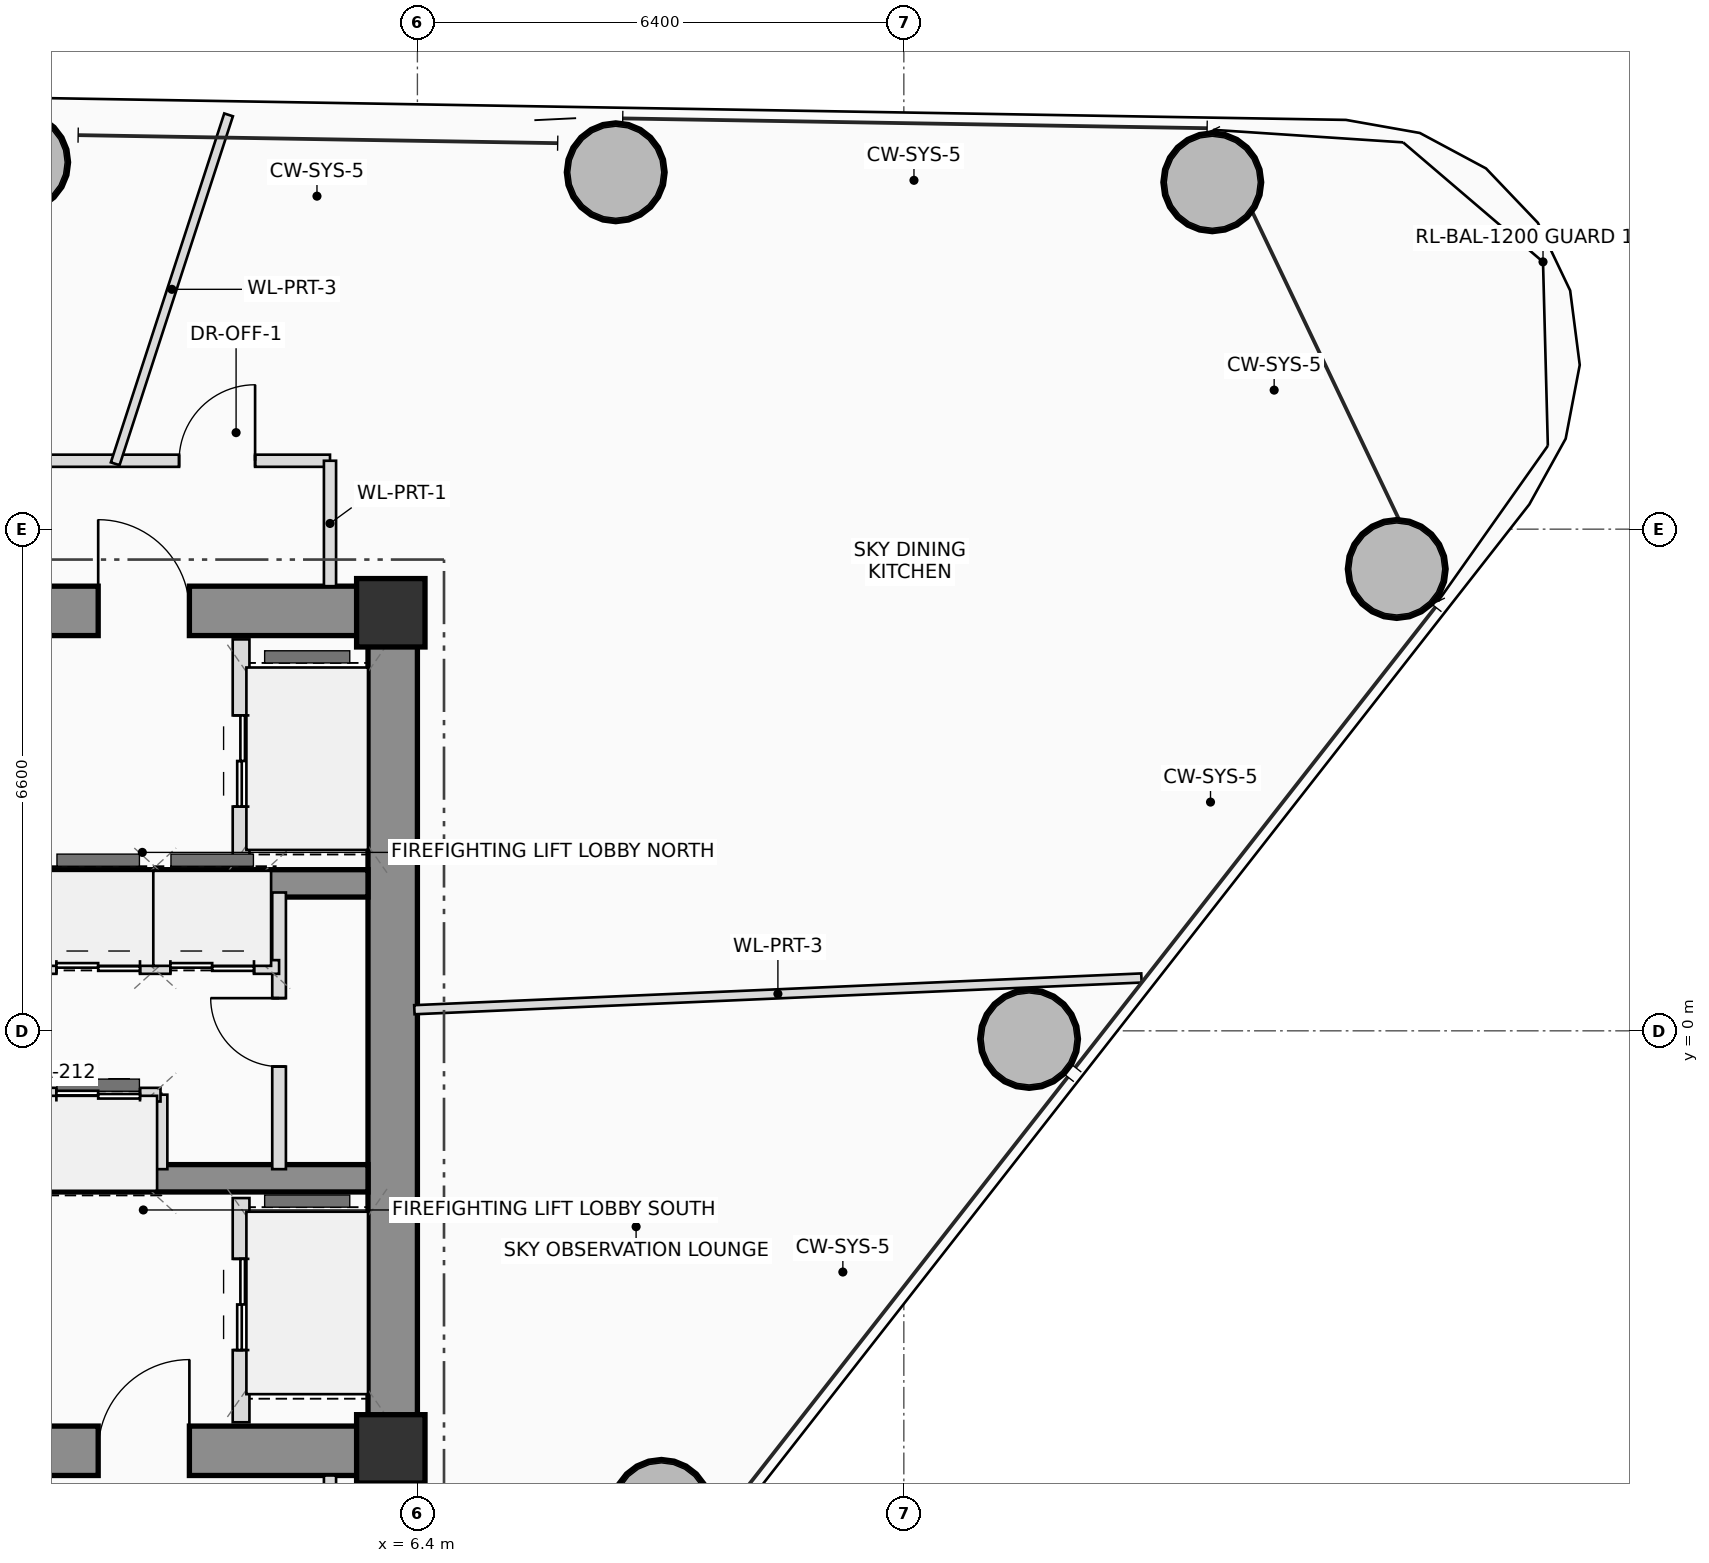
"""IFC4 building model, lengths in metres.
Left out: names, types, materials, properties, quantities, classifications, styles, units other than length and angle.
Written with IfcOpenShell. Run it as: python <this file> out.ifc"""

import sys

from ifc_helpers import new_model, si_unit, direction, frame, frame_2d, origin, origin_2d, place, context, subcontext, project, spatial, rectangle, hollow_circle, extrude, source, transform, mapped, element, fill, save


model = new_model("IFC4")
c1 = context("Model", 3, precision=1e-05, world=origin(), true_north=direction((0.0, 1.0)))
c2 = subcontext(c1, "Body", "Model", "MODEL_VIEW")
j1 = project(units=[si_unit("LENGTHUNIT", "METRE"), si_unit("PLANEANGLEUNIT", "RADIAN")], contexts=[c1])
p1 = place(None, origin())
s1 = spatial("IfcSite", under=j1, at=p1, CompositionType="ELEMENT")
p2 = place(p1, origin())
s2 = spatial("IfcBuilding", under=s1, at=p2, CompositionType="ELEMENT")
p3 = place(p2, frame((0.0, 0.0, 125.0)))
s3 = spatial("IfcBuildingStorey", under=s2, at=p3, CompositionType="ELEMENT", Elevation=125.0)
m1 = source(origin(), c2, "Body", "SweptSolid", [
    extrude(rectangle(XDim=0.9, YDim=0.9, at=origin_2d()), origin(), (0.0, 0.0, 1.0), 4.5),
])
for number, where, z_axis, x_axis in (
    (1, (6.05, -5.5, 0.0), (0.0, 0.0, 1.0), (1.0, 0.0, 0.0)),
    (2, (6.05, 5.5, 0.0), (0.0, 0.0, 1.0), (1.0, 0.0, 0.0)),
):
    element("IfcColumn", number, at=place(p3, frame(where, z_axis=z_axis, x_axis=x_axis)), inside=s3, PredefinedType="COLUMN", context=c2, shape_type="MappedRepresentation", body=[
        mapped(m1, transform((0.0, 0.0, 0.0), scale=1.0)),
    ])
p4 = place(p3, frame((-6.4, 5.525, 0.0), z_axis=(0.0, 0.0, 1.0), x_axis=(1.0, 0.0, 0.0)))
e3 = element("IfcWall", 3, at=p4, inside=s3, PredefinedType="SHEAR", context=c2, shape_type="SweptSolid", body=[
    extrude(rectangle(XDim=12.8, YDim=0.65, at=frame_2d((6.4, 0.0))), origin(), (0.0, 0.0, 1.0), 4.5),
])
p5 = place(p4, frame((8.6, 0.0, 0.0)))
e4 = element("IfcOpeningElement", 4, at=p5, cuts=e3, PredefinedType="OPENING", context=c2, shape_type="SweptSolid", body=[
    extrude(rectangle(XDim=1.2, YDim=2.2, at=frame_2d((0.6, 1.1))), frame((0.0, 0.335, 0.0), z_axis=(0.0, -1.0, 0.0), x_axis=(1.0, 0.0, 0.0)), (0.0, 0.0, 1.0), 0.67),
])
p6 = place(p3, frame((-6.4, -5.525, 0.0), z_axis=(0.0, 0.0, 1.0), x_axis=(1.0, 0.0, 0.0)))
e5 = element("IfcWall", 5, at=p6, inside=s3, PredefinedType="SHEAR", context=c2, shape_type="SweptSolid", body=[
    extrude(rectangle(XDim=12.8, YDim=0.65, at=frame_2d((6.4, 0.0))), origin(), (0.0, 0.0, 1.0), 4.5),
])
p7 = place(p6, frame((8.6, 0.0, 0.0)))
e6 = element("IfcOpeningElement", 6, at=p7, cuts=e5, PredefinedType="OPENING", context=c2, shape_type="SweptSolid", body=[
    extrude(rectangle(XDim=1.2, YDim=2.2, at=frame_2d((0.6, 1.1))), frame((0.0, 0.335, 0.0), z_axis=(0.0, -1.0, 0.0), x_axis=(1.0, 0.0, 0.0)), (0.0, 0.0, 1.0), 0.67),
])
p8 = place(p3, frame((6.075, -5.2, 0.0), z_axis=(0.0, 0.0, 1.0), x_axis=(0.0, 1.0, 0.0)))
e7 = element("IfcWall", 7, at=p8, inside=s3, PredefinedType="SHEAR", context=c2, shape_type="SweptSolid", body=[
    extrude(rectangle(XDim=10.4, YDim=0.65, at=frame_2d((5.2, 0.0))), origin(), (0.0, 0.0, 1.0), 4.5),
])
for number, where, z_axis, x_axis in (
    (8, (-5.75, 1.94, 0.0), (0.0, 0.0, 1.0), (1.0, 0.0, 0.0)),
    (9, (-5.75, -1.94, 0.0), (0.0, 0.0, 1.0), (1.0, 0.0, 0.0)),
):
    element("IfcWall", number, at=place(p3, frame(where, z_axis=z_axis, x_axis=x_axis)), inside=s3, PredefinedType="SHEAR", context=c2, shape_type="SweptSolid", body=[
        extrude(rectangle(XDim=11.5, YDim=0.36, at=frame_2d((5.75, 0.0))), origin(), (0.0, 0.0, 1.0), 4.5),
    ])
m2 = source(origin(), c2, "Body", "SweptSolid", [
    extrude(hollow_circle(Radius=0.65, WallThickness=0.045, at=origin_2d()), origin(), (0.0, 0.0, 1.0), 4.5),
])
for number, where, z_axis, x_axis in (
    (10, (9.611, -6.289, 0.0), (0.0, 0.0, 1.0), (1.0, 0.0, 0.0)),
    (11, (14.448, -0.107, 0.0), (0.0, 0.0, 1.0), (1.0, 0.0, 0.0)),
    (12, (19.285, 6.076, 0.0), (0.0, 0.0, 1.0), (1.0, 0.0, 0.0)),
    (13, (16.858, 11.164, 0.0), (0.0, 0.0, 1.0), (1.0, 0.0, 0.0)),
    (14, (9.01, 11.295, 0.0), (0.0, 0.0, 1.0), (1.0, 0.0, 0.0)),
    (15, (1.16, 11.427, 0.0), (0.0, 0.0, 1.0), (1.0, 0.0, 0.0)),
):
    element("IfcColumn", number, at=place(p3, frame(where, z_axis=z_axis, x_axis=x_axis)), inside=s3, PredefinedType="COLUMN", context=c2, shape_type="MappedRepresentation", body=[
        mapped(m2, transform((0.0, 0.0, 0.0), scale=1.0)),
    ])
p9 = place(p3, frame((4.08, 2.2, 0.0), z_axis=(0.0, 0.0, 1.0), x_axis=(0.0, 1.0, 0.0)))
e16 = element("IfcWall", 16, at=p9, inside=s3, PredefinedType="PLUMBINGWALL", context=c2, shape_type="SweptSolid", body=[
    extrude(rectangle(XDim=2.95, YDim=0.22, at=frame_2d((1.475, 0.0))), origin(), (0.0, 0.0, 1.0), 4.3),
])
p10 = place(p9, frame((0.75, 0.0, 0.0)))
e17 = element("IfcOpeningElement", 17, at=p10, cuts=e16, PredefinedType="OPENING", context=c2, shape_type="SweptSolid", body=[
    extrude(rectangle(XDim=1.2, YDim=2.25, at=frame_2d((0.6, 1.125))), frame((0.0, 0.12, 0.0), z_axis=(0.0, -1.0, 0.0), x_axis=(1.0, 0.0, 0.0)), (0.0, 0.0, 1.0), 0.24),
])
p11 = place(p3, frame((4.08, -5.15, 0.0), z_axis=(0.0, 0.0, 1.0), x_axis=(0.0, 1.0, 0.0)))
e18 = element("IfcWall", 18, at=p11, inside=s3, PredefinedType="PLUMBINGWALL", context=c2, shape_type="SweptSolid", body=[
    extrude(rectangle(XDim=2.95, YDim=0.22, at=frame_2d((1.475, 0.0))), origin(), (0.0, 0.0, 1.0), 4.3),
])
p12 = place(p11, frame((0.95, 0.0, 0.0)))
e19 = element("IfcOpeningElement", 19, at=p12, cuts=e18, PredefinedType="OPENING", context=c2, shape_type="SweptSolid", body=[
    extrude(rectangle(XDim=1.2, YDim=2.25, at=frame_2d((0.6, 1.125))), frame((0.0, 0.12, 0.0), z_axis=(0.0, -1.0, 0.0), x_axis=(1.0, 0.0, 0.0)), (0.0, 0.0, 1.0), 0.24),
])
for number, where, z_axis, x_axis in (
    (20, (3.02, 0.84, 0.0), (0.0, 0.0, 1.0), (0.0, 1.0, 0.0)),
    (21, (4.38, 0.84, 0.0), (0.0, 0.0, 1.0), (0.0, 1.0, 0.0)),
    (22, (3.02, -1.82, 0.0), (0.0, 0.0, 1.0), (0.0, 1.0, 0.0)),
):
    element("IfcWall", number, at=place(p3, frame(where, z_axis=z_axis, x_axis=x_axis)), inside=s3, PredefinedType="PLUMBINGWALL", context=c2, shape_type="SweptSolid", body=[
        extrude(rectangle(XDim=0.98, YDim=0.18, at=frame_2d((0.49, 0.0))), origin(), (0.0, 0.0, 1.0), 4.3),
    ])
p13 = place(p3, frame((4.58, -1.82, 0.0), z_axis=(0.0, 0.0, 1.0), x_axis=(0.0, 1.0, 0.0)))
e23 = element("IfcWall", 23, at=p13, inside=s3, PredefinedType="PLUMBINGWALL", context=c2, shape_type="SweptSolid", body=[
    extrude(rectangle(XDim=3.64, YDim=0.18, at=frame_2d((1.82, 0.0))), origin(), (0.0, 0.0, 1.0), 4.3),
])
p14 = place(p13, frame((1.35, 0.0, 0.0)))
e24 = element("IfcOpeningElement", 24, at=p14, cuts=e23, PredefinedType="OPENING", context=c2, shape_type="SweptSolid", body=[
    extrude(rectangle(XDim=0.9, YDim=2.05, at=frame_2d((0.45, 1.025))), frame((0.0, 0.1, 0.0), z_axis=(0.0, -1.0, 0.0), x_axis=(1.0, 0.0, 0.0)), (0.0, 0.0, 1.0), 0.2),
])
p15 = place(p3, frame((-5.68, 0.84, 0.0), z_axis=(0.0, 0.0, 1.0), x_axis=(1.0, 0.0, 0.0)))
e25 = element("IfcWall", 25, at=p15, inside=s3, PredefinedType="PLUMBINGWALL", context=c2, shape_type="SweptSolid", body=[
    extrude(rectangle(XDim=10.26, YDim=0.18, at=frame_2d((5.13, 0.0))), origin(), (0.0, 0.0, 1.0), 4.3),
])
p16 = place(p15, frame((1.08, 0.0, 0.0)))
e26 = element("IfcOpeningElement", 26, at=p16, cuts=e25, PredefinedType="OPENING", context=c2, shape_type="SweptSolid", body=[
    extrude(rectangle(XDim=0.9, YDim=2.05, at=frame_2d((0.45, 1.025))), frame((0.0, 0.1, 0.0), z_axis=(0.0, -1.0, 0.0), x_axis=(1.0, 0.0, 0.0)), (0.0, 0.0, 1.0), 0.2),
])
p17 = place(p15, frame((3.93, 0.0, 0.0)))
e27 = element("IfcOpeningElement", 27, at=p17, cuts=e25, PredefinedType="OPENING", context=c2, shape_type="SweptSolid", body=[
    extrude(rectangle(XDim=1.1, YDim=2.2, at=frame_2d((0.55, 1.1))), frame((0.0, 0.1, 0.0), z_axis=(0.0, -1.0, 0.0), x_axis=(1.0, 0.0, 0.0)), (0.0, 0.0, 1.0), 0.2),
])
p18 = place(p15, frame((5.63, 0.0, 0.0)))
e28 = element("IfcOpeningElement", 28, at=p18, cuts=e25, PredefinedType="OPENING", context=c2, shape_type="SweptSolid", body=[
    extrude(rectangle(XDim=1.1, YDim=2.2, at=frame_2d((0.55, 1.1))), frame((0.0, 0.1, 0.0), z_axis=(0.0, -1.0, 0.0), x_axis=(1.0, 0.0, 0.0)), (0.0, 0.0, 1.0), 0.2),
])
p19 = place(p15, frame((7.33, 0.0, 0.0)))
e29 = element("IfcOpeningElement", 29, at=p19, cuts=e25, PredefinedType="OPENING", context=c2, shape_type="SweptSolid", body=[
    extrude(rectangle(XDim=1.1, YDim=2.2, at=frame_2d((0.55, 1.1))), frame((0.0, 0.1, 0.0), z_axis=(0.0, -1.0, 0.0), x_axis=(1.0, 0.0, 0.0)), (0.0, 0.0, 1.0), 0.2),
])
p20 = place(p15, frame((8.83, 0.0, 0.0)))
e30 = element("IfcOpeningElement", 30, at=p20, cuts=e25, PredefinedType="OPENING", context=c2, shape_type="SweptSolid", body=[
    extrude(rectangle(XDim=1.1, YDim=2.2, at=frame_2d((0.55, 1.1))), frame((0.0, 0.1, 0.0), z_axis=(0.0, -1.0, 0.0), x_axis=(1.0, 0.0, 0.0)), (0.0, 0.0, 1.0), 0.2),
])
p21 = place(p3, frame((-5.68, -0.84, 0.0), z_axis=(0.0, 0.0, 1.0), x_axis=(1.0, 0.0, 0.0)))
e31 = element("IfcWall", 31, at=p21, inside=s3, PredefinedType="PLUMBINGWALL", context=c2, shape_type="SweptSolid", body=[
    extrude(rectangle(XDim=8.7, YDim=0.18, at=frame_2d((4.35, 0.0))), origin(), (0.0, 0.0, 1.0), 4.3),
])
p22 = place(p21, frame((1.68, 0.0, 0.0)))
e32 = element("IfcOpeningElement", 32, at=p22, cuts=e31, PredefinedType="OPENING", context=c2, shape_type="SweptSolid", body=[
    extrude(rectangle(XDim=0.9, YDim=2.05, at=frame_2d((0.45, 1.025))), frame((0.0, 0.1, 0.0), z_axis=(0.0, -1.0, 0.0), x_axis=(1.0, 0.0, 0.0)), (0.0, 0.0, 1.0), 0.2),
])
p23 = place(p21, frame((3.93, 0.0, 0.0)))
e33 = element("IfcOpeningElement", 33, at=p23, cuts=e31, PredefinedType="OPENING", context=c2, shape_type="SweptSolid", body=[
    extrude(rectangle(XDim=1.1, YDim=2.2, at=frame_2d((0.55, 1.1))), frame((0.0, 0.1, 0.0), z_axis=(0.0, -1.0, 0.0), x_axis=(1.0, 0.0, 0.0)), (0.0, 0.0, 1.0), 0.2),
])
p24 = place(p21, frame((5.63, 0.0, 0.0)))
e34 = element("IfcOpeningElement", 34, at=p24, cuts=e31, PredefinedType="OPENING", context=c2, shape_type="SweptSolid", body=[
    extrude(rectangle(XDim=1.1, YDim=2.2, at=frame_2d((0.55, 1.1))), frame((0.0, 0.1, 0.0), z_axis=(0.0, -1.0, 0.0), x_axis=(1.0, 0.0, 0.0)), (0.0, 0.0, 1.0), 0.2),
])
p25 = place(p21, frame((7.33, 0.0, 0.0)))
e35 = element("IfcOpeningElement", 35, at=p25, cuts=e31, PredefinedType="OPENING", context=c2, shape_type="SweptSolid", body=[
    extrude(rectangle(XDim=1.1, YDim=2.2, at=frame_2d((0.55, 1.1))), frame((0.0, 0.1, 0.0), z_axis=(0.0, -1.0, 0.0), x_axis=(1.0, 0.0, 0.0)), (0.0, 0.0, 1.0), 0.2),
])
p26 = place(p3, frame((-6.36, 7.5, 0.0), z_axis=(0.0, 0.0, 1.0), x_axis=(1.0, 0.0, 0.0)))
e36 = element("IfcWall", 36, at=p26, inside=s3, PredefinedType="PARTITIONING", context=c2, shape_type="SweptSolid", body=[
    extrude(rectangle(XDim=11.61, YDim=0.16, at=frame_2d((5.805, 0.0))), origin(), (0.0, 0.0, 1.0), 3.655),
])
p27 = place(p26, frame((9.625, 0.0, 0.0)))
e37 = element("IfcOpeningElement", 37, at=p27, cuts=e36, PredefinedType="OPENING", context=c2, shape_type="SweptSolid", body=[
    extrude(rectangle(XDim=1.0, YDim=2.25, at=frame_2d((0.5, 1.125))), frame((0.0, 0.09, 0.0), z_axis=(0.0, -1.0, 0.0), x_axis=(1.0, 0.0, 0.0)), (0.0, 0.0, 1.0), 0.18),
])
p28 = place(p3, frame((5.25, 7.5, 0.0), z_axis=(0.0, 0.0, 1.0), x_axis=(0.0, -1.0, 0.0)))
e38 = element("IfcWall", 38, at=p28, inside=s3, PredefinedType="PARTITIONING", context=c2, shape_type="SweptSolid", body=[
    extrude(rectangle(XDim=1.65, YDim=0.16, at=frame_2d((0.825, 0.0))), origin(), (0.0, 0.0, 1.0), 3.655),
])
p29 = place(p3, frame((5.25, -5.85, 0.0), z_axis=(0.0, 0.0, 1.0), x_axis=(0.0, -1.0, 0.0)))
e39 = element("IfcWall", 39, at=p29, inside=s3, PredefinedType="PARTITIONING", context=c2, shape_type="SweptSolid", body=[
    extrude(rectangle(XDim=1.65, YDim=0.16, at=frame_2d((0.825, 0.0))), origin(), (0.0, 0.0, 1.0), 4.3),
])
p30 = place(p3, frame((6.36, 0.278, 0.0), z_axis=(0.0, 0.0, 1.0), x_axis=(0.999047913846, 0.043626435113, 0.0)))
e40 = element("IfcWall", 40, at=p30, inside=s3, PredefinedType="PARTITIONING", context=c2, shape_type="SweptSolid", body=[
    extrude(rectangle(XDim=9.575, YDim=0.12, at=frame_2d((4.788, 0.0))), origin(), (0.0, 0.0, 1.0), 3.655),
])
p31 = place(p3, frame((2.424, 7.46, 0.0), z_axis=(0.0, 0.0, 1.0), x_axis=(0.309026602798, 0.951053394275, 0.0)))
e41 = element("IfcWall", 41, at=p31, inside=s3, PredefinedType="PARTITIONING", context=c2, shape_type="SweptSolid", body=[
    extrude(rectangle(XDim=4.827, YDim=0.12, at=frame_2d((2.414, 0.0))), origin(), (0.0, 0.0, 1.0), 3.655),
])
p32 = place(p5, origin())
e42 = element("IfcDoor", 42, at=p32, inside=s3, OperationType="SINGLE_SWING_LEFT", PredefinedType="DOOR", context=c2, shape_type="SweptSolid", body=[
    extrude(rectangle(XDim=1.2, YDim=2.2, at=frame_2d((0.6, 1.1))), frame((0.0, 0.025, 0.0), z_axis=(0.0, -1.0, 0.0), x_axis=(1.0, 0.0, 0.0)), (0.0, 0.0, 1.0), 0.05),
])
fill(e4, e42)
p33 = place(p7, origin())
e43 = element("IfcDoor", 43, at=p33, inside=s3, OperationType="SINGLE_SWING_RIGHT", PredefinedType="DOOR", context=c2, shape_type="SweptSolid", body=[
    extrude(rectangle(XDim=1.2, YDim=2.2, at=frame_2d((0.6, 1.1))), frame((0.0, 0.025, 0.0), z_axis=(0.0, -1.0, 0.0), x_axis=(1.0, 0.0, 0.0)), (0.0, 0.0, 1.0), 0.05),
])
fill(e6, e43)
p34 = place(p10, origin())
e44 = element("IfcDoor", 44, at=p34, inside=s3, OperationType="DOUBLE_DOOR_SLIDING", PredefinedType="DOOR", context=c2, shape_type="SweptSolid", body=[
    extrude(rectangle(XDim=1.2, YDim=2.25, at=frame_2d((0.6, 1.125))), frame((0.0, 0.025, 0.0), z_axis=(0.0, -1.0, 0.0), x_axis=(1.0, 0.0, 0.0)), (0.0, 0.0, 1.0), 0.05),
])
fill(e17, e44)
p35 = place(p12, origin())
e45 = element("IfcDoor", 45, at=p35, inside=s3, OperationType="DOUBLE_DOOR_SLIDING", PredefinedType="DOOR", context=c2, shape_type="SweptSolid", body=[
    extrude(rectangle(XDim=1.2, YDim=2.25, at=frame_2d((0.6, 1.125))), frame((0.0, 0.025, 0.0), z_axis=(0.0, -1.0, 0.0), x_axis=(1.0, 0.0, 0.0)), (0.0, 0.0, 1.0), 0.05),
])
fill(e19, e45)
p36 = place(p14, origin())
e46 = element("IfcDoor", 46, at=p36, inside=s3, OperationType="SINGLE_SWING_RIGHT", PredefinedType="DOOR", context=c2, shape_type="SweptSolid", body=[
    extrude(rectangle(XDim=0.9, YDim=2.05, at=frame_2d((0.45, 1.025))), frame((0.0, 0.025, 0.0), z_axis=(0.0, -1.0, 0.0), x_axis=(1.0, 0.0, 0.0)), (0.0, 0.0, 1.0), 0.05),
])
fill(e24, e46)
p37 = place(p19, origin())
e47 = element("IfcDoor", 47, at=p37, inside=s3, OperationType="DOUBLE_DOOR_SLIDING", PredefinedType="DOOR", context=c2, shape_type="SweptSolid", body=[
    extrude(rectangle(XDim=1.1, YDim=2.2, at=frame_2d((0.55, 1.1))), frame((0.0, 0.025, 0.0), z_axis=(0.0, -1.0, 0.0), x_axis=(1.0, 0.0, 0.0)), (0.0, 0.0, 1.0), 0.05),
])
fill(e29, e47)
p38 = place(p20, origin())
e48 = element("IfcDoor", 48, at=p38, inside=s3, OperationType="DOUBLE_DOOR_SLIDING", PredefinedType="DOOR", context=c2, shape_type="SweptSolid", body=[
    extrude(rectangle(XDim=1.1, YDim=2.2, at=frame_2d((0.55, 1.1))), frame((0.0, 0.025, 0.0), z_axis=(0.0, -1.0, 0.0), x_axis=(1.0, 0.0, 0.0)), (0.0, 0.0, 1.0), 0.05),
])
fill(e30, e48)
p39 = place(p25, origin())
e49 = element("IfcDoor", 49, at=p39, inside=s3, OperationType="DOUBLE_DOOR_SLIDING", PredefinedType="DOOR", context=c2, shape_type="SweptSolid", body=[
    extrude(rectangle(XDim=1.1, YDim=2.2, at=frame_2d((0.55, 1.1))), frame((0.0, 0.025, 0.0), z_axis=(0.0, -1.0, 0.0), x_axis=(1.0, 0.0, 0.0)), (0.0, 0.0, 1.0), 0.05),
])
fill(e35, e49)
p40 = place(p27, origin())
e50 = element("IfcDoor", 50, at=p40, inside=s3, OperationType="SINGLE_SWING_RIGHT", PredefinedType="DOOR", context=c2, shape_type="SweptSolid", body=[
    extrude(rectangle(XDim=1.0, YDim=2.25, at=frame_2d((0.5, 1.125))), frame((0.0, 0.025, 0.0), z_axis=(0.0, -1.0, 0.0), x_axis=(1.0, 0.0, 0.0)), (0.0, 0.0, 1.0), 0.05),
])
fill(e37, e50)
save(model, sys.argv[1])
